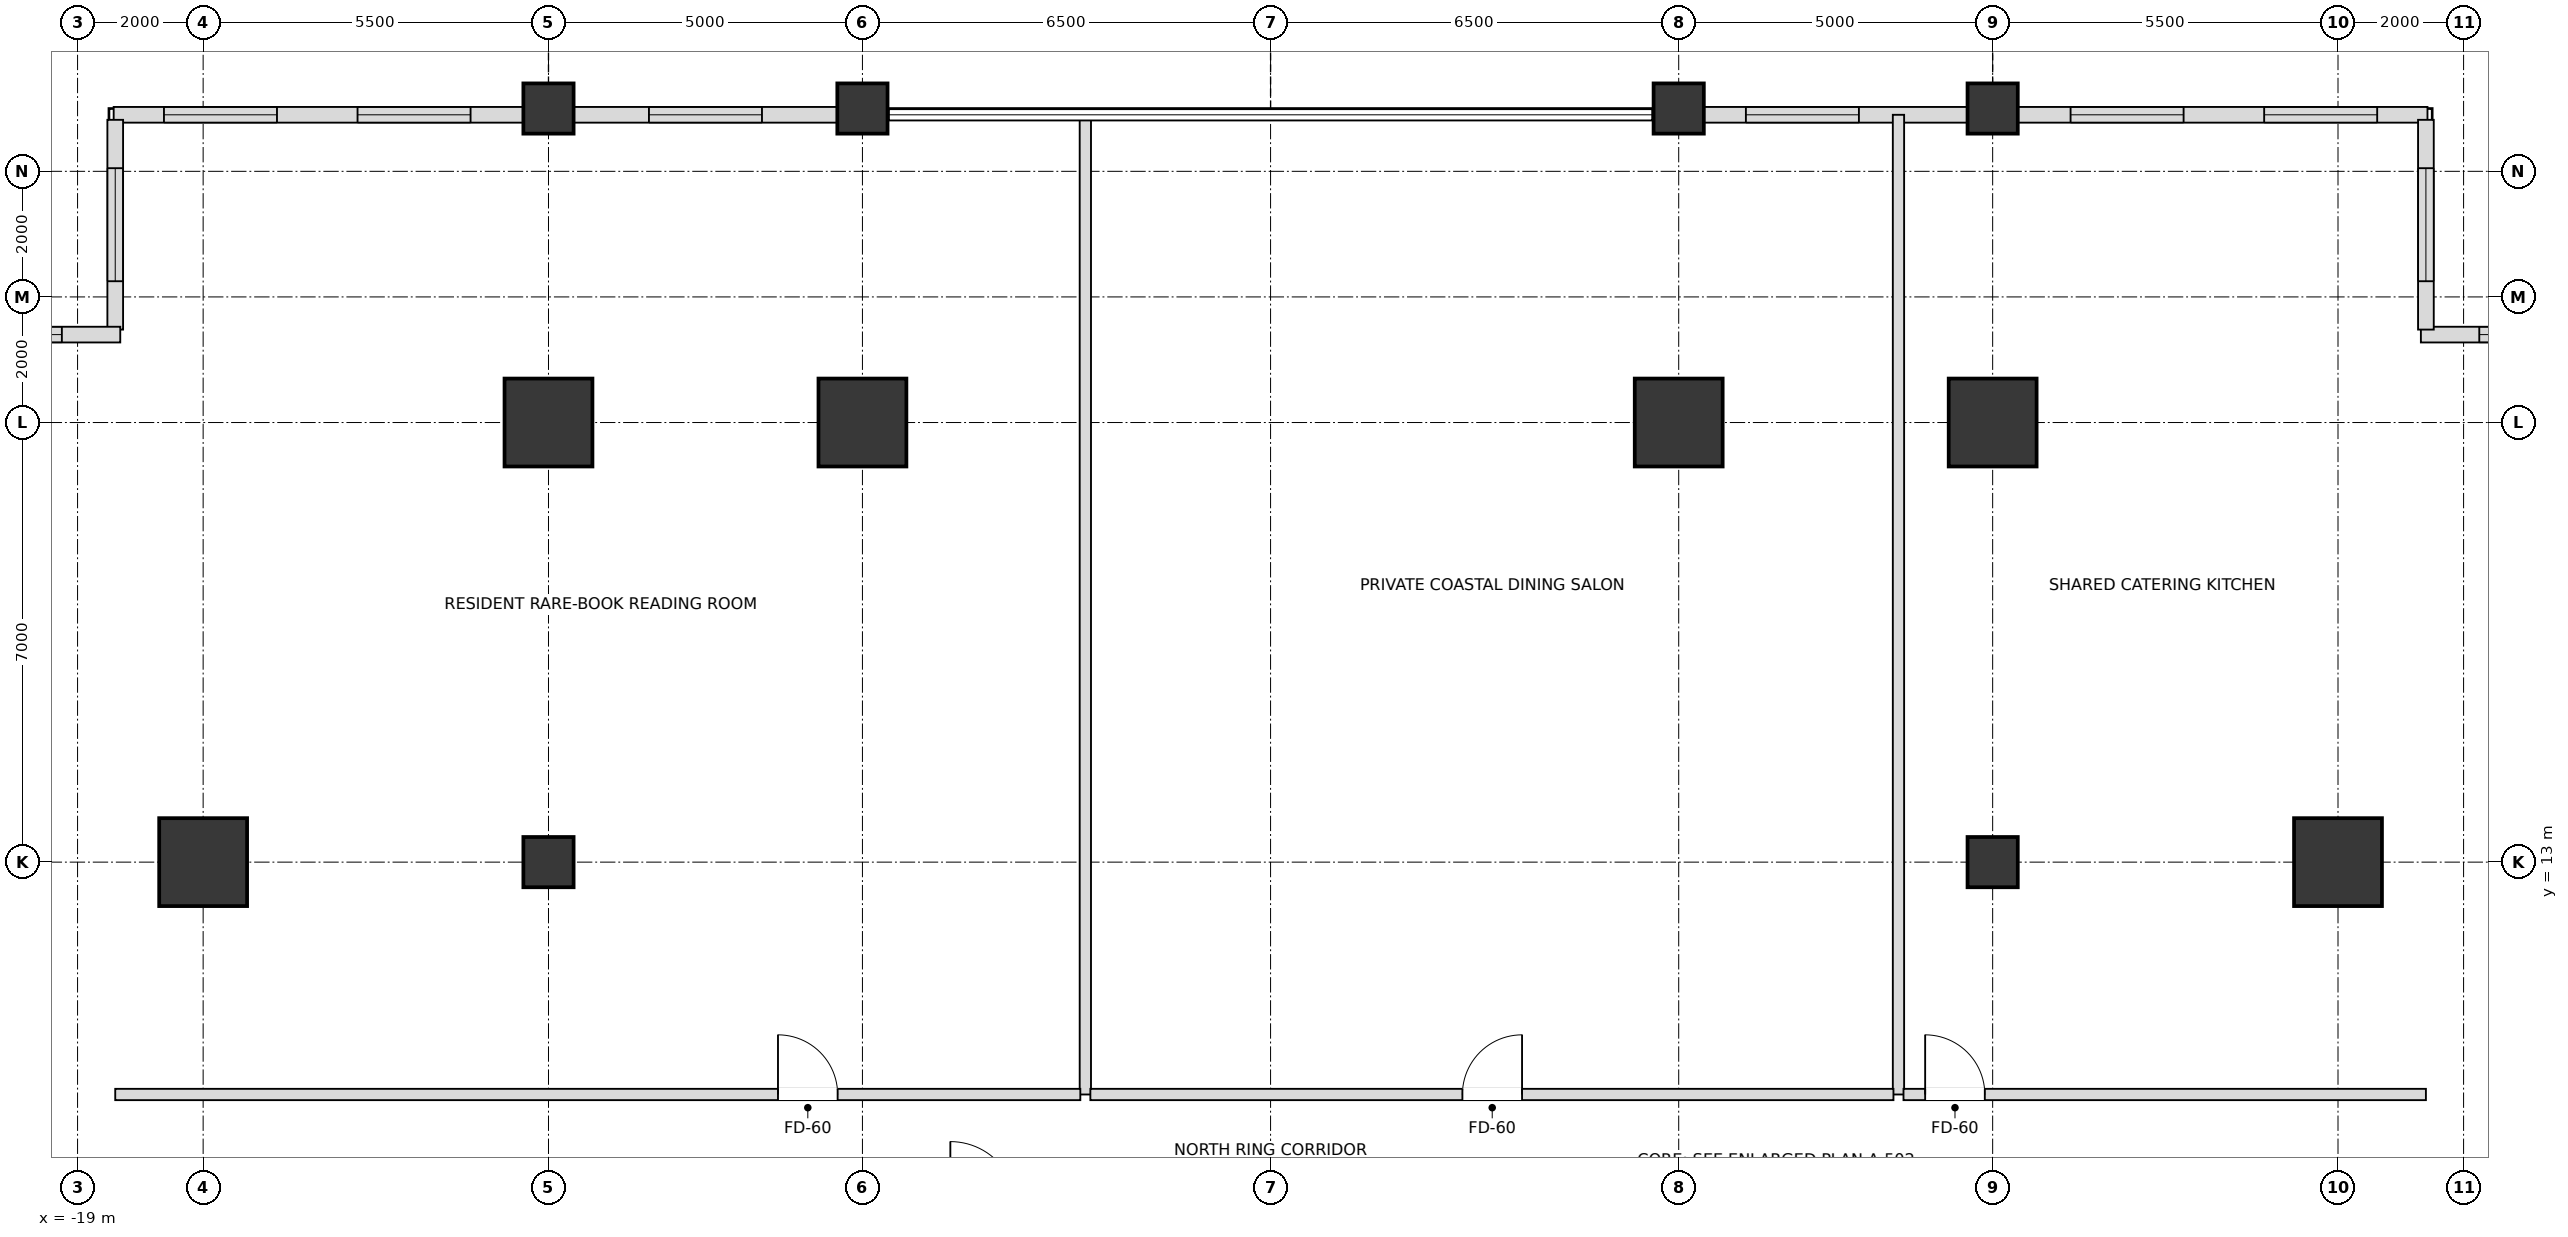
"""IFC4 building model, lengths in metres.
Left out: names, types, materials, properties, quantities, classifications, styles, units other than length and angle.
Written with IfcOpenShell. Run it as: python <this file> out.ifc"""

import sys

from ifc_helpers import new_model, si_unit, direction, frame, frame_2d, origin, origin_2d, place, context, subcontext, project, spatial, rectangle, extrude, element, fill, save


model = new_model("IFC4")
c1 = context("Model", 3, precision=1e-05, world=origin(), true_north=direction((0.0, 1.0)))
c2 = subcontext(c1, "Body", "Model", "MODEL_VIEW")
j1 = project(units=[si_unit("LENGTHUNIT", "METRE"), si_unit("PLANEANGLEUNIT", "RADIAN")], contexts=[c1])
p1 = place(None, origin())
s1 = spatial("IfcSite", under=j1, at=p1, CompositionType="ELEMENT")
p2 = place(p1, origin())
s2 = spatial("IfcBuilding", under=s1, at=p2, CompositionType="ELEMENT")
p3 = place(p2, frame((0.0, 0.0, 82.8)))
s3 = spatial("IfcBuildingStorey", under=s2, at=p3, CompositionType="ELEMENT", Elevation=82.8)
for number, where, z_axis, x_axis in (
    (1, (17.0, 13.0, 0.0), (0.0, 0.0, 1.0), (1.0, 0.0, 0.0)),
    (2, (11.5, 20.0, 0.0), (0.0, 0.0, 1.0), (1.0, 0.0, 0.0)),
    (3, (6.5, 20.0, 0.0), (0.0, 0.0, 1.0), (1.0, 0.0, 0.0)),
    (4, (-6.5, 20.0, 0.0), (0.0, 0.0, 1.0), (1.0, 0.0, 0.0)),
    (5, (-11.5, 20.0, 0.0), (0.0, 0.0, 1.0), (1.0, 0.0, 0.0)),
    (6, (-17.0, 13.0, 0.0), (0.0, 0.0, 1.0), (1.0, 0.0, 0.0)),
):
    element("IfcColumn", number, at=place(p3, frame(where, z_axis=z_axis, x_axis=x_axis)), inside=s3, PredefinedType="USERDEFINED", context=c2, shape_type="SweptSolid", body=[
        extrude(rectangle(XDim=1.4, YDim=1.4, at=origin_2d()), origin(), (0.0, 0.0, 1.0), 3.6),
    ])
for number, where, z_axis, x_axis in (
    (7, (-11.5, 13.0, 0.0), (0.0, 0.0, 1.0), (1.0, 0.0, 0.0)),
    (8, (11.5, 13.0, 0.0), (0.0, 0.0, 1.0), (1.0, 0.0, 0.0)),
    (9, (-11.5, 25.0, 0.0), (0.0, 0.0, 1.0), (1.0, 0.0, 0.0)),
    (10, (-6.5, 25.0, 0.0), (0.0, 0.0, 1.0), (1.0, 0.0, 0.0)),
    (11, (6.5, 25.0, 0.0), (0.0, 0.0, 1.0), (1.0, 0.0, 0.0)),
    (12, (11.5, 25.0, 0.0), (0.0, 0.0, 1.0), (1.0, 0.0, 0.0)),
):
    element("IfcColumn", number, at=place(p3, frame(where, z_axis=z_axis, x_axis=x_axis)), inside=s3, PredefinedType="COLUMN", context=c2, shape_type="SweptSolid", body=[
        extrude(rectangle(XDim=0.8, YDim=0.8, at=origin_2d()), origin(), (0.0, 0.0, 1.0), 3.6),
    ])
p4 = place(p3, frame((18.425, 24.9, 0.0), z_axis=(0.0, 0.0, 1.0), x_axis=(-1.0, 0.0, 0.0)))
e13 = element("IfcWall", 13, at=p4, inside=s3, PredefinedType="SOLIDWALL", context=c2, shape_type="SweptSolid", body=[
    extrude(rectangle(XDim=6.53, YDim=0.25, at=frame_2d((3.265, 0.0))), origin(), (0.0, 0.0, 1.0), 2.736),
])
p5 = place(p4, frame((0.801, 0.0, 0.72)))
e14 = element("IfcOpeningElement", 14, at=p5, cuts=e13, PredefinedType="OPENING", context=c2, shape_type="SweptSolid", body=[
    extrude(rectangle(XDim=1.8, YDim=1.68, at=frame_2d((0.9, 0.84))), frame((0.0, 0.135, 0.0), z_axis=(0.0, -1.0, 0.0), x_axis=(1.0, 0.0, 0.0)), (0.0, 0.0, 1.0), 0.27),
])
p6 = place(p4, frame((3.884, 0.0, 0.72)))
e15 = element("IfcOpeningElement", 15, at=p6, cuts=e13, PredefinedType="OPENING", context=c2, shape_type="SweptSolid", body=[
    extrude(rectangle(XDim=1.8, YDim=1.68, at=frame_2d((0.9, 0.84))), frame((0.0, 0.135, 0.0), z_axis=(0.0, -1.0, 0.0), x_axis=(1.0, 0.0, 0.0)), (0.0, 0.0, 1.0), 0.27),
])
p7 = place(p3, frame((11.105, 24.9, 0.0), z_axis=(0.0, 0.0, 1.0), x_axis=(-1.0, 0.0, 0.0)))
e16 = element("IfcWall", 16, at=p7, inside=s3, PredefinedType="SOLIDWALL", context=c2, shape_type="SweptSolid", body=[
    extrude(rectangle(XDim=4.21, YDim=0.25, at=frame_2d((2.105, 0.0))), origin(), (0.0, 0.0, 1.0), 2.736),
])
p8 = place(p7, frame((1.735, 0.0, 0.72)))
e17 = element("IfcOpeningElement", 17, at=p8, cuts=e16, PredefinedType="OPENING", context=c2, shape_type="SweptSolid", body=[
    extrude(rectangle(XDim=1.8, YDim=1.68, at=frame_2d((0.9, 0.84))), frame((0.0, 0.135, 0.0), z_axis=(0.0, -1.0, 0.0), x_axis=(1.0, 0.0, 0.0)), (0.0, 0.0, 1.0), 0.27),
])
p9 = place(p3, frame((-6.895, 24.9, 0.0), z_axis=(0.0, 0.0, 1.0), x_axis=(-1.0, 0.0, 0.0)))
e18 = element("IfcWall", 18, at=p9, inside=s3, PredefinedType="SOLIDWALL", context=c2, shape_type="SweptSolid", body=[
    extrude(rectangle(XDim=4.21, YDim=0.25, at=frame_2d((2.105, 0.0))), origin(), (0.0, 0.0, 1.0), 2.736),
])
p10 = place(p9, frame((1.205, 0.0, 0.72)))
e19 = element("IfcOpeningElement", 19, at=p10, cuts=e18, PredefinedType="OPENING", context=c2, shape_type="SweptSolid", body=[
    extrude(rectangle(XDim=1.8, YDim=1.68, at=frame_2d((0.9, 0.84))), frame((0.0, 0.135, 0.0), z_axis=(0.0, -1.0, 0.0), x_axis=(1.0, 0.0, 0.0)), (0.0, 0.0, 1.0), 0.27),
])
p11 = place(p3, frame((-11.895, 24.9, 0.0), z_axis=(0.0, 0.0, 1.0), x_axis=(-1.0, 0.0, 0.0)))
e20 = element("IfcWall", 20, at=p11, inside=s3, PredefinedType="SOLIDWALL", context=c2, shape_type="SweptSolid", body=[
    extrude(rectangle(XDim=6.53, YDim=0.25, at=frame_2d((3.265, 0.0))), origin(), (0.0, 0.0, 1.0), 2.736),
])
p12 = place(p11, frame((0.846, 0.0, 0.72)))
e21 = element("IfcOpeningElement", 21, at=p12, cuts=e20, PredefinedType="OPENING", context=c2, shape_type="SweptSolid", body=[
    extrude(rectangle(XDim=1.8, YDim=1.68, at=frame_2d((0.9, 0.84))), frame((0.0, 0.135, 0.0), z_axis=(0.0, -1.0, 0.0), x_axis=(1.0, 0.0, 0.0)), (0.0, 0.0, 1.0), 0.27),
])
p13 = place(p11, frame((3.929, 0.0, 0.72)))
e22 = element("IfcOpeningElement", 22, at=p13, cuts=e20, PredefinedType="OPENING", context=c2, shape_type="SweptSolid", body=[
    extrude(rectangle(XDim=1.8, YDim=1.68, at=frame_2d((0.9, 0.84))), frame((0.0, 0.135, 0.0), z_axis=(0.0, -1.0, 0.0), x_axis=(1.0, 0.0, 0.0)), (0.0, 0.0, 1.0), 0.27),
])
p14 = place(p3, frame((21.98, 21.4, 0.0), z_axis=(0.0, 0.0, 1.0), x_axis=(-1.0, 0.0, 0.0)))
e23 = element("IfcWall", 23, at=p14, inside=s3, PredefinedType="SOLIDWALL", context=c2, shape_type="SweptSolid", body=[
    extrude(rectangle(XDim=3.66, YDim=0.25, at=frame_2d((1.83, 0.0))), origin(), (0.0, 0.0, 1.0), 2.736),
])
p15 = place(p14, frame((0.93, 0.0, 0.72)))
e24 = element("IfcOpeningElement", 24, at=p15, cuts=e23, PredefinedType="OPENING", context=c2, shape_type="SweptSolid", body=[
    extrude(rectangle(XDim=1.8, YDim=1.68, at=frame_2d((0.9, 0.84))), frame((0.0, 0.135, 0.0), z_axis=(0.0, -1.0, 0.0), x_axis=(1.0, 0.0, 0.0)), (0.0, 0.0, 1.0), 0.27),
])
p16 = place(p3, frame((18.4, 21.48, 0.0), z_axis=(0.0, 0.0, 1.0), x_axis=(0.0, 1.0, 0.0)))
e25 = element("IfcWall", 25, at=p16, inside=s3, PredefinedType="SOLIDWALL", context=c2, shape_type="SweptSolid", body=[
    extrude(rectangle(XDim=3.34, YDim=0.25, at=frame_2d((1.67, 0.0))), origin(), (0.0, 0.0, 1.0), 2.736),
])
p17 = place(p16, frame((0.77, 0.0, 0.72)))
e26 = element("IfcOpeningElement", 26, at=p17, cuts=e25, PredefinedType="OPENING", context=c2, shape_type="SweptSolid", body=[
    extrude(rectangle(XDim=1.8, YDim=1.68, at=frame_2d((0.9, 0.84))), frame((0.0, 0.135, 0.0), z_axis=(0.0, -1.0, 0.0), x_axis=(1.0, 0.0, 0.0)), (0.0, 0.0, 1.0), 0.27),
])
p18 = place(p3, frame((-18.4, 24.82, 0.0), z_axis=(0.0, 0.0, 1.0), x_axis=(0.0, -1.0, 0.0)))
e27 = element("IfcWall", 27, at=p18, inside=s3, PredefinedType="SOLIDWALL", context=c2, shape_type="SweptSolid", body=[
    extrude(rectangle(XDim=3.34, YDim=0.25, at=frame_2d((1.67, 0.0))), origin(), (0.0, 0.0, 1.0), 2.736),
])
p19 = place(p18, frame((0.77, 0.0, 0.72)))
e28 = element("IfcOpeningElement", 28, at=p19, cuts=e27, PredefinedType="OPENING", context=c2, shape_type="SweptSolid", body=[
    extrude(rectangle(XDim=1.8, YDim=1.68, at=frame_2d((0.9, 0.84))), frame((0.0, 0.135, 0.0), z_axis=(0.0, -1.0, 0.0), x_axis=(1.0, 0.0, 0.0)), (0.0, 0.0, 1.0), 0.27),
])
p20 = place(p3, frame((-18.32, 21.4, 0.0), z_axis=(0.0, 0.0, 1.0), x_axis=(-1.0, 0.0, 0.0)))
e29 = element("IfcWall", 29, at=p20, inside=s3, PredefinedType="SOLIDWALL", context=c2, shape_type="SweptSolid", body=[
    extrude(rectangle(XDim=3.66, YDim=0.25, at=frame_2d((1.83, 0.0))), origin(), (0.0, 0.0, 1.0), 2.736),
])
p21 = place(p20, frame((0.93, 0.0, 0.72)))
e30 = element("IfcOpeningElement", 30, at=p21, cuts=e29, PredefinedType="OPENING", context=c2, shape_type="SweptSolid", body=[
    extrude(rectangle(XDim=1.8, YDim=1.68, at=frame_2d((0.9, 0.84))), frame((0.0, 0.135, 0.0), z_axis=(0.0, -1.0, 0.0), x_axis=(1.0, 0.0, 0.0)), (0.0, 0.0, 1.0), 0.27),
])
for number, where, z_axis, x_axis in (
    (31, (-2.95, 9.3, 0.0), (0.0, 0.0, 1.0), (0.0, 1.0, 0.0)),
    (32, (10.0, 9.3, 0.0), (0.0, 0.0, 1.0), (0.0, 1.0, 0.0)),
):
    element("IfcWall", number, at=place(p3, frame(where, z_axis=z_axis, x_axis=x_axis)), inside=s3, PredefinedType="PARTITIONING", context=c2, shape_type="SweptSolid", body=[
        extrude(rectangle(XDim=15.6, YDim=0.18, at=frame_2d((7.8, 0.0))), origin(), (0.0, 0.0, 1.0), 2.816),
    ])
p22 = place(p3, frame((-18.4, 9.3, 0.0), z_axis=(0.0, 0.0, 1.0), x_axis=(1.0, 0.0, 0.0)))
e33 = element("IfcWall", 33, at=p22, inside=s3, PredefinedType="PARTITIONING", context=c2, shape_type="SweptSolid", body=[
    extrude(rectangle(XDim=15.37, YDim=0.18, at=frame_2d((7.685, 0.0))), origin(), (0.0, 0.0, 1.0), 2.816),
])
p23 = place(p22, frame((10.555, 0.0, 0.0)))
e34 = element("IfcOpeningElement", 34, at=p23, cuts=e33, PredefinedType="OPENING", context=c2, shape_type="SweptSolid", body=[
    extrude(rectangle(XDim=0.95, YDim=2.15, at=frame_2d((0.475, 1.075))), frame((0.0, 0.1, 0.0), z_axis=(0.0, -1.0, 0.0), x_axis=(1.0, 0.0, 0.0)), (0.0, 0.0, 1.0), 0.2),
])
p24 = place(p3, frame((-2.87, 9.3, 0.0), z_axis=(0.0, 0.0, 1.0), x_axis=(1.0, 0.0, 0.0)))
e35 = element("IfcWall", 35, at=p24, inside=s3, PredefinedType="PARTITIONING", context=c2, shape_type="SweptSolid", body=[
    extrude(rectangle(XDim=12.79, YDim=0.18, at=frame_2d((6.395, 0.0))), origin(), (0.0, 0.0, 1.0), 2.816),
])
p25 = place(p24, frame((5.925, 0.0, 0.0)))
e36 = element("IfcOpeningElement", 36, at=p25, cuts=e35, PredefinedType="OPENING", context=c2, shape_type="SweptSolid", body=[
    extrude(rectangle(XDim=0.95, YDim=2.15, at=frame_2d((0.475, 1.075))), frame((0.0, 0.1, 0.0), z_axis=(0.0, -1.0, 0.0), x_axis=(1.0, 0.0, 0.0)), (0.0, 0.0, 1.0), 0.2),
])
p26 = place(p3, frame((10.08, 9.3, 0.0), z_axis=(0.0, 0.0, 1.0), x_axis=(1.0, 0.0, 0.0)))
e37 = element("IfcWall", 37, at=p26, inside=s3, PredefinedType="PARTITIONING", context=c2, shape_type="SweptSolid", body=[
    extrude(rectangle(XDim=8.32, YDim=0.18, at=frame_2d((4.16, 0.0))), origin(), (0.0, 0.0, 1.0), 2.816),
])
p27 = place(p26, frame((0.345, 0.0, 0.0)))
e38 = element("IfcOpeningElement", 38, at=p27, cuts=e37, PredefinedType="OPENING", context=c2, shape_type="SweptSolid", body=[
    extrude(rectangle(XDim=0.95, YDim=2.15, at=frame_2d((0.475, 1.075))), frame((0.0, 0.1, 0.0), z_axis=(0.0, -1.0, 0.0), x_axis=(1.0, 0.0, 0.0)), (0.0, 0.0, 1.0), 0.2),
])
p28 = place(p5, origin())
e39 = element("IfcWindow", 39, at=p28, inside=s3, PartitioningType="SINGLE_PANEL", PredefinedType="WINDOW", context=c2, shape_type="SweptSolid", body=[
    extrude(rectangle(XDim=1.8, YDim=1.68, at=frame_2d((0.9, 0.84))), frame((0.0, 0.03, 0.0), z_axis=(0.0, -1.0, 0.0), x_axis=(1.0, 0.0, 0.0)), (0.0, 0.0, 1.0), 0.06),
])
fill(e14, e39)
p29 = place(p6, origin())
e40 = element("IfcWindow", 40, at=p29, inside=s3, PartitioningType="SINGLE_PANEL", PredefinedType="WINDOW", context=c2, shape_type="SweptSolid", body=[
    extrude(rectangle(XDim=1.8, YDim=1.68, at=frame_2d((0.9, 0.84))), frame((0.0, 0.03, 0.0), z_axis=(0.0, -1.0, 0.0), x_axis=(1.0, 0.0, 0.0)), (0.0, 0.0, 1.0), 0.06),
])
fill(e15, e40)
p30 = place(p8, origin())
e41 = element("IfcWindow", 41, at=p30, inside=s3, PartitioningType="SINGLE_PANEL", PredefinedType="WINDOW", context=c2, shape_type="SweptSolid", body=[
    extrude(rectangle(XDim=1.8, YDim=1.68, at=frame_2d((0.9, 0.84))), frame((0.0, 0.03, 0.0), z_axis=(0.0, -1.0, 0.0), x_axis=(1.0, 0.0, 0.0)), (0.0, 0.0, 1.0), 0.06),
])
fill(e17, e41)
p31 = place(p10, origin())
e42 = element("IfcWindow", 42, at=p31, inside=s3, PartitioningType="SINGLE_PANEL", PredefinedType="WINDOW", context=c2, shape_type="SweptSolid", body=[
    extrude(rectangle(XDim=1.8, YDim=1.68, at=frame_2d((0.9, 0.84))), frame((0.0, 0.03, 0.0), z_axis=(0.0, -1.0, 0.0), x_axis=(1.0, 0.0, 0.0)), (0.0, 0.0, 1.0), 0.06),
])
fill(e19, e42)
p32 = place(p12, origin())
e43 = element("IfcWindow", 43, at=p32, inside=s3, PartitioningType="SINGLE_PANEL", PredefinedType="WINDOW", context=c2, shape_type="SweptSolid", body=[
    extrude(rectangle(XDim=1.8, YDim=1.68, at=frame_2d((0.9, 0.84))), frame((0.0, 0.03, 0.0), z_axis=(0.0, -1.0, 0.0), x_axis=(1.0, 0.0, 0.0)), (0.0, 0.0, 1.0), 0.06),
])
fill(e21, e43)
p33 = place(p13, origin())
e44 = element("IfcWindow", 44, at=p33, inside=s3, PartitioningType="SINGLE_PANEL", PredefinedType="WINDOW", context=c2, shape_type="SweptSolid", body=[
    extrude(rectangle(XDim=1.8, YDim=1.68, at=frame_2d((0.9, 0.84))), frame((0.0, 0.03, 0.0), z_axis=(0.0, -1.0, 0.0), x_axis=(1.0, 0.0, 0.0)), (0.0, 0.0, 1.0), 0.06),
])
fill(e22, e44)
p34 = place(p15, origin())
e45 = element("IfcWindow", 45, at=p34, inside=s3, PartitioningType="SINGLE_PANEL", PredefinedType="WINDOW", context=c2, shape_type="SweptSolid", body=[
    extrude(rectangle(XDim=1.8, YDim=1.68, at=frame_2d((0.9, 0.84))), frame((0.0, 0.03, 0.0), z_axis=(0.0, -1.0, 0.0), x_axis=(1.0, 0.0, 0.0)), (0.0, 0.0, 1.0), 0.06),
])
fill(e24, e45)
p35 = place(p17, origin())
e46 = element("IfcWindow", 46, at=p35, inside=s3, PartitioningType="SINGLE_PANEL", PredefinedType="WINDOW", context=c2, shape_type="SweptSolid", body=[
    extrude(rectangle(XDim=1.8, YDim=1.68, at=frame_2d((0.9, 0.84))), frame((0.0, 0.03, 0.0), z_axis=(0.0, -1.0, 0.0), x_axis=(1.0, 0.0, 0.0)), (0.0, 0.0, 1.0), 0.06),
])
fill(e26, e46)
p36 = place(p19, origin())
e47 = element("IfcWindow", 47, at=p36, inside=s3, PartitioningType="SINGLE_PANEL", PredefinedType="WINDOW", context=c2, shape_type="SweptSolid", body=[
    extrude(rectangle(XDim=1.8, YDim=1.68, at=frame_2d((0.9, 0.84))), frame((0.0, 0.03, 0.0), z_axis=(0.0, -1.0, 0.0), x_axis=(1.0, 0.0, 0.0)), (0.0, 0.0, 1.0), 0.06),
])
fill(e28, e47)
p37 = place(p21, origin())
e48 = element("IfcWindow", 48, at=p37, inside=s3, PartitioningType="SINGLE_PANEL", PredefinedType="WINDOW", context=c2, shape_type="SweptSolid", body=[
    extrude(rectangle(XDim=1.8, YDim=1.68, at=frame_2d((0.9, 0.84))), frame((0.0, 0.03, 0.0), z_axis=(0.0, -1.0, 0.0), x_axis=(1.0, 0.0, 0.0)), (0.0, 0.0, 1.0), 0.06),
])
fill(e30, e48)
p38 = place(p23, origin())
e49 = element("IfcDoor", 49, at=p38, inside=s3, OperationType="SINGLE_SWING_LEFT", PredefinedType="DOOR", context=c2, shape_type="SweptSolid", body=[
    extrude(rectangle(XDim=0.95, YDim=2.15, at=frame_2d((0.475, 1.075))), frame((0.0, 0.025, 0.0), z_axis=(0.0, -1.0, 0.0), x_axis=(1.0, 0.0, 0.0)), (0.0, 0.0, 1.0), 0.05),
])
fill(e34, e49)
p39 = place(p25, origin())
e50 = element("IfcDoor", 50, at=p39, inside=s3, OperationType="SINGLE_SWING_RIGHT", PredefinedType="DOOR", context=c2, shape_type="SweptSolid", body=[
    extrude(rectangle(XDim=0.95, YDim=2.15, at=frame_2d((0.475, 1.075))), frame((0.0, 0.025, 0.0), z_axis=(0.0, -1.0, 0.0), x_axis=(1.0, 0.0, 0.0)), (0.0, 0.0, 1.0), 0.05),
])
fill(e36, e50)
p40 = place(p27, origin())
e51 = element("IfcDoor", 51, at=p40, inside=s3, OperationType="SINGLE_SWING_LEFT", PredefinedType="DOOR", context=c2, shape_type="SweptSolid", body=[
    extrude(rectangle(XDim=0.95, YDim=2.15, at=frame_2d((0.475, 1.075))), frame((0.0, 0.025, 0.0), z_axis=(0.0, -1.0, 0.0), x_axis=(1.0, 0.0, 0.0)), (0.0, 0.0, 1.0), 0.05),
])
fill(e38, e51)
save(model, sys.argv[1])
